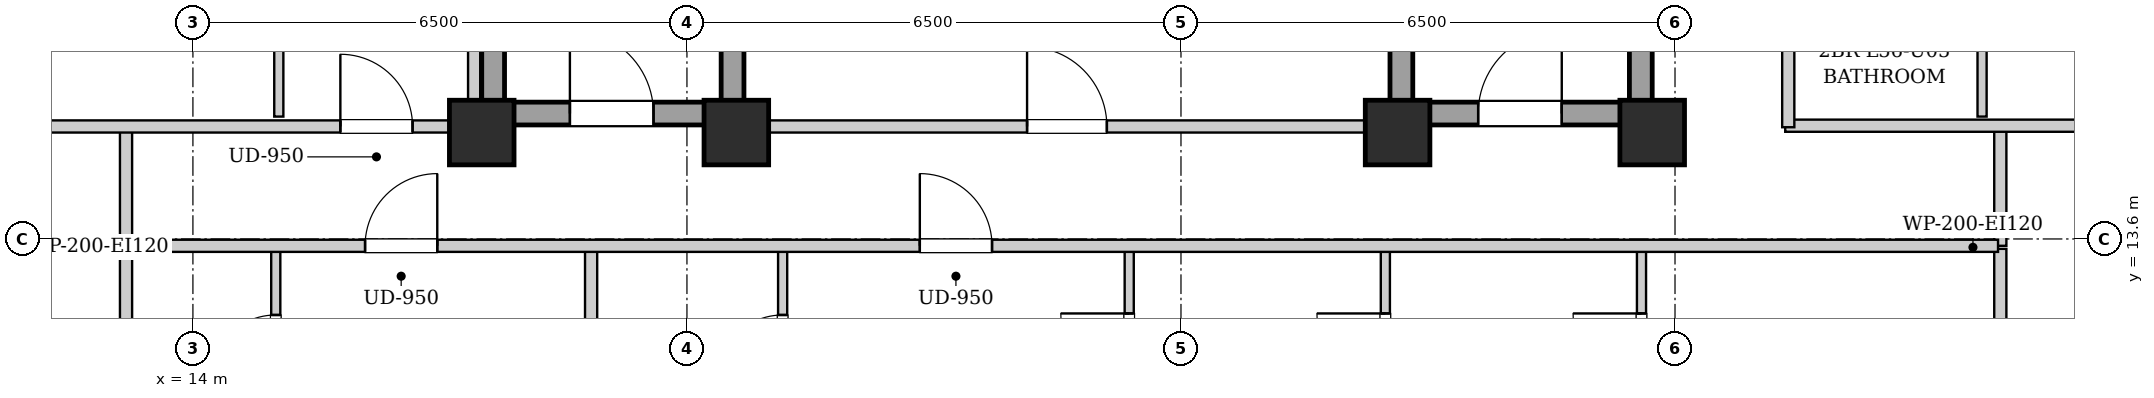
"""IFC4 building model, lengths in metres.
Left out: names, types, materials, properties, quantities, classifications, styles, units other than length and angle.
Written with IfcOpenShell. Run it as: python <this file> out.ifc"""

import sys

from ifc_helpers import new_model, si_unit, direction, frame, frame_2d, origin, origin_2d, place, context, subcontext, project, spatial, rectangle, extrude, element, fill, save


model = new_model("IFC4")
c1 = context("Model", 3, precision=1e-05, world=origin(), true_north=direction((0.0, 1.0)))
c2 = subcontext(c1, "Body", "Model", "MODEL_VIEW")
j1 = project(units=[si_unit("LENGTHUNIT", "METRE"), si_unit("PLANEANGLEUNIT", "RADIAN")], contexts=[c1])
p1 = place(None, origin())
s1 = spatial("IfcSite", under=j1, at=p1, CompositionType="ELEMENT")
p2 = place(p1, origin())
s2 = spatial("IfcBuilding", under=s1, at=p2, CompositionType="ELEMENT")
p3 = place(p2, frame((0.0, 0.0, 194.2)))
s3 = spatial("IfcBuildingStorey", under=s2, at=p3, CompositionType="ELEMENT", Elevation=194.2)
for number, where, z_axis, x_axis in (
    (1, (17.8, 15.0, 0.0), (0.0, 0.0, 1.0), (1.0, 0.0, 0.0)),
    (2, (21.15, 15.0, 0.0), (0.0, 0.0, 1.0), (1.0, 0.0, 0.0)),
    (3, (29.85, 15.0, 0.0), (0.0, 0.0, 1.0), (1.0, 0.0, 0.0)),
    (4, (33.2, 15.0, 0.0), (0.0, 0.0, 1.0), (1.0, 0.0, 0.0)),
):
    element("IfcColumn", number, at=place(p3, frame(where, z_axis=z_axis, x_axis=x_axis)), inside=s3, PredefinedType="COLUMN", context=c2, shape_type="SweptSolid", body=[
        extrude(rectangle(XDim=0.85, YDim=0.85, at=origin_2d()), origin(), (0.0, 0.0, 1.0), 3.3),
    ])
for number, where, z_axis, x_axis in (
    (5, (17.95, 15.1, 0.0), (0.0, 0.0, 1.0), (0.0, 1.0, 0.0)),
    (6, (21.1, 15.1, 0.0), (0.0, 0.0, 1.0), (0.0, 1.0, 0.0)),
):
    element("IfcWall", number, at=place(p3, frame(where, z_axis=z_axis, x_axis=x_axis)), inside=s3, PredefinedType="SHEAR", context=c2, shape_type="SweptSolid", body=[
        extrude(rectangle(XDim=9.0, YDim=0.3, at=frame_2d((4.5, 0.0))), origin(), (0.0, 0.0, 1.0), 3.04),
    ])
p4 = place(p3, frame((18.1, 15.25, 0.0), z_axis=(0.0, 0.0, 1.0), x_axis=(1.0, 0.0, 0.0)))
e7 = element("IfcWall", 7, at=p4, inside=s3, PredefinedType="SHEAR", context=c2, shape_type="SweptSolid", body=[
    extrude(rectangle(XDim=2.85, YDim=0.3, at=frame_2d((1.425, 0.0))), origin(), (0.0, 0.0, 1.0), 3.04),
])
p5 = place(p4, frame((0.86, 0.0, 0.0)))
e8 = element("IfcOpeningElement", 8, at=p5, cuts=e7, PredefinedType="OPENING", context=c2, shape_type="SweptSolid", body=[
    extrude(rectangle(XDim=1.1, YDim=2.05, at=frame_2d((0.55, 1.025))), frame((0.0, 0.16, 0.0), z_axis=(0.0, -1.0, 0.0), x_axis=(1.0, 0.0, 0.0)), (0.0, 0.0, 1.0), 0.32),
])
for number, where, z_axis, x_axis in (
    (9, (29.9, 15.1, 0.0), (0.0, 0.0, 1.0), (0.0, 1.0, 0.0)),
    (10, (33.05, 15.1, 0.0), (0.0, 0.0, 1.0), (0.0, 1.0, 0.0)),
):
    element("IfcWall", number, at=place(p3, frame(where, z_axis=z_axis, x_axis=x_axis)), inside=s3, PredefinedType="SHEAR", context=c2, shape_type="SweptSolid", body=[
        extrude(rectangle(XDim=9.0, YDim=0.3, at=frame_2d((4.5, 0.0))), origin(), (0.0, 0.0, 1.0), 3.04),
    ])
p6 = place(p3, frame((30.05, 15.25, 0.0), z_axis=(0.0, 0.0, 1.0), x_axis=(1.0, 0.0, 0.0)))
e11 = element("IfcWall", 11, at=p6, inside=s3, PredefinedType="SHEAR", context=c2, shape_type="SweptSolid", body=[
    extrude(rectangle(XDim=2.85, YDim=0.3, at=frame_2d((1.425, 0.0))), origin(), (0.0, 0.0, 1.0), 3.04),
])
p7 = place(p6, frame((0.86, 0.0, 0.0)))
e12 = element("IfcOpeningElement", 12, at=p7, cuts=e11, PredefinedType="OPENING", context=c2, shape_type="SweptSolid", body=[
    extrude(rectangle(XDim=1.1, YDim=2.05, at=frame_2d((0.55, 1.025))), frame((0.0, 0.16, 0.0), z_axis=(0.0, -1.0, 0.0), x_axis=(1.0, 0.0, 0.0)), (0.0, 0.0, 1.0), 0.32),
])
p8 = place(p3, frame((21.25, 15.08, 0.0), z_axis=(0.0, 0.0, 1.0), x_axis=(1.0, 0.0, 0.0)))
e13 = element("IfcWall", 13, at=p8, inside=s3, PredefinedType="PARTITIONING", context=c2, shape_type="SweptSolid", body=[
    extrude(rectangle(XDim=8.5, YDim=0.16, at=frame_2d((4.25, 0.0))), origin(), (0.0, 0.0, 1.0), 2.556),
])
p9 = place(p8, frame((3.725, 0.0, 0.0)))
e14 = element("IfcOpeningElement", 14, at=p9, cuts=e13, PredefinedType="OPENING", context=c2, shape_type="SweptSolid", body=[
    extrude(rectangle(XDim=1.05, YDim=2.05, at=frame_2d((0.525, 1.025))), frame((0.0, 0.09, 0.0), z_axis=(0.0, -1.0, 0.0), x_axis=(1.0, 0.0, 0.0)), (0.0, 0.0, 1.0), 0.18),
])
for number, where, z_axis, x_axis in (
    (15, (13.12, 13.51, 0.0), (0.0, 0.0, 1.0), (0.0, 1.0, 0.0)),
    (16, (37.78, 13.51, 0.0), (0.0, 0.0, 1.0), (0.0, 1.0, 0.0)),
):
    element("IfcWall", number, at=place(p3, frame(where, z_axis=z_axis, x_axis=x_axis)), inside=s3, PredefinedType="PARTITIONING", context=c2, shape_type="SweptSolid", body=[
        extrude(rectangle(XDim=1.58, YDim=0.16, at=frame_2d((0.79, 0.0))), origin(), (0.0, 0.0, 1.0), 3.04),
    ])
p10 = place(p3, frame((34.95, 15.09, 0.0), z_axis=(0.0, 0.0, 1.0), x_axis=(1.0, 0.0, 0.0)))
e17 = element("IfcWall", 17, at=p10, inside=s3, PredefinedType="PARTITIONING", context=c2, shape_type="SweptSolid", body=[
    extrude(rectangle(XDim=5.07, YDim=0.16, at=frame_2d((2.535, 0.0))), origin(), (0.0, 0.0, 1.0), 2.556),
])
p11 = place(p3, frame((13.12, 10.81, 0.0), z_axis=(0.0, 0.0, 1.0), x_axis=(0.0, 1.0, 0.0)))
e18 = element("IfcWall", 18, at=p11, inside=s3, PredefinedType="PARTITIONING", context=c2, shape_type="SweptSolid", body=[
    extrude(rectangle(XDim=2.66, YDim=0.16, at=frame_2d((1.33, 0.0))), origin(), (0.0, 0.0, 1.0), 3.04),
])
p12 = place(p3, frame((15.09, 10.87, 0.0), z_axis=(0.0, 0.0, 1.0), x_axis=(0.0, 1.0, 0.0)))
e19 = element("IfcWall", 19, at=p12, inside=s3, PredefinedType="PARTITIONING", context=c2, shape_type="SweptSolid", body=[
    extrude(rectangle(XDim=2.6, YDim=0.12, at=frame_2d((1.3, 0.0))), origin(), (0.0, 0.0, 1.0), 3.04),
])
p13 = place(p12, frame((0.87, 0.0, 0.0)))
e20 = element("IfcOpeningElement", 20, at=p13, cuts=e19, PredefinedType="OPENING", context=c2, shape_type="SweptSolid", body=[
    extrude(rectangle(XDim=0.86, YDim=2.05, at=frame_2d((0.43, 1.025))), frame((0.0, 0.07, 0.0), z_axis=(0.0, -1.0, 0.0), x_axis=(1.0, 0.0, 0.0)), (0.0, 0.0, 1.0), 0.14),
])
p14 = place(p3, frame((37.78, 10.81, 0.0), z_axis=(0.0, 0.0, 1.0), x_axis=(0.0, 1.0, 0.0)))
e21 = element("IfcWall", 21, at=p14, inside=s3, PredefinedType="PARTITIONING", context=c2, shape_type="SweptSolid", body=[
    extrude(rectangle(XDim=2.66, YDim=0.16, at=frame_2d((1.33, 0.0))), origin(), (0.0, 0.0, 1.0), 3.04),
])
p15 = place(p3, frame((19.239, 6.06, 0.0), z_axis=(0.0, 0.0, 1.0), x_axis=(0.0, 1.0, 0.0)))
e22 = element("IfcWall", 22, at=p15, inside=s3, PredefinedType="PARTITIONING", context=c2, shape_type="SweptSolid", body=[
    extrude(rectangle(XDim=7.41, YDim=0.16, at=frame_2d((3.705, 0.0))), origin(), (0.0, 0.0, 1.0), 3.04),
])
p16 = place(p3, frame((21.759, 10.87, 0.0), z_axis=(0.0, 0.0, 1.0), x_axis=(0.0, 1.0, 0.0)))
e23 = element("IfcWall", 23, at=p16, inside=s3, PredefinedType="PARTITIONING", context=c2, shape_type="SweptSolid", body=[
    extrude(rectangle(XDim=2.6, YDim=0.12, at=frame_2d((1.3, 0.0))), origin(), (0.0, 0.0, 1.0), 3.04),
])
p17 = place(p16, frame((0.87, 0.0, 0.0)))
e24 = element("IfcOpeningElement", 24, at=p17, cuts=e23, PredefinedType="OPENING", context=c2, shape_type="SweptSolid", body=[
    extrude(rectangle(XDim=0.86, YDim=2.05, at=frame_2d((0.43, 1.025))), frame((0.0, 0.07, 0.0), z_axis=(0.0, -1.0, 0.0), x_axis=(1.0, 0.0, 0.0)), (0.0, 0.0, 1.0), 0.14),
])
p18 = place(p3, frame((26.319, 10.87, 0.0), z_axis=(0.0, 0.0, 1.0), x_axis=(0.0, 1.0, 0.0)))
e25 = element("IfcWall", 25, at=p18, inside=s3, PredefinedType="PARTITIONING", context=c2, shape_type="SweptSolid", body=[
    extrude(rectangle(XDim=2.6, YDim=0.12, at=frame_2d((1.3, 0.0))), origin(), (0.0, 0.0, 1.0), 3.04),
])
p19 = place(p18, frame((0.85, 0.0, 0.0)))
e26 = element("IfcOpeningElement", 26, at=p19, cuts=e25, PredefinedType="OPENING", context=c2, shape_type="SweptSolid", body=[
    extrude(rectangle(XDim=0.9, YDim=2.05, at=frame_2d((0.45, 1.025))), frame((0.0, 0.07, 0.0), z_axis=(0.0, -1.0, 0.0), x_axis=(1.0, 0.0, 0.0)), (0.0, 0.0, 1.0), 0.14),
])
p20 = place(p3, frame((29.689, 10.87, 0.0), z_axis=(0.0, 0.0, 1.0), x_axis=(0.0, 1.0, 0.0)))
e27 = element("IfcWall", 27, at=p20, inside=s3, PredefinedType="PARTITIONING", context=c2, shape_type="SweptSolid", body=[
    extrude(rectangle(XDim=2.6, YDim=0.12, at=frame_2d((1.3, 0.0))), origin(), (0.0, 0.0, 1.0), 3.04),
])
p21 = place(p20, frame((0.85, 0.0, 0.0)))
e28 = element("IfcOpeningElement", 28, at=p21, cuts=e27, PredefinedType="OPENING", context=c2, shape_type="SweptSolid", body=[
    extrude(rectangle(XDim=0.9, YDim=2.05, at=frame_2d((0.45, 1.025))), frame((0.0, 0.07, 0.0), z_axis=(0.0, -1.0, 0.0), x_axis=(1.0, 0.0, 0.0)), (0.0, 0.0, 1.0), 0.14),
])
p22 = place(p3, frame((33.059, 10.87, 0.0), z_axis=(0.0, 0.0, 1.0), x_axis=(0.0, 1.0, 0.0)))
e29 = element("IfcWall", 29, at=p22, inside=s3, PredefinedType="PARTITIONING", context=c2, shape_type="SweptSolid", body=[
    extrude(rectangle(XDim=2.6, YDim=0.12, at=frame_2d((1.3, 0.0))), origin(), (0.0, 0.0, 1.0), 3.04),
])
p23 = place(p22, frame((0.85, 0.0, 0.0)))
e30 = element("IfcOpeningElement", 30, at=p23, cuts=e29, PredefinedType="OPENING", context=c2, shape_type="SweptSolid", body=[
    extrude(rectangle(XDim=0.9, YDim=2.05, at=frame_2d((0.45, 1.025))), frame((0.0, 0.07, 0.0), z_axis=(0.0, -1.0, 0.0), x_axis=(1.0, 0.0, 0.0)), (0.0, 0.0, 1.0), 0.14),
])
p24 = place(p3, frame((10.88, 15.08, 0.0), z_axis=(0.0, 0.0, 1.0), x_axis=(1.0, 0.0, 0.0)))
e31 = element("IfcWall", 31, at=p24, inside=s3, PredefinedType="PARTITIONING", context=c2, shape_type="SweptSolid", body=[
    extrude(rectangle(XDim=6.88, YDim=0.16, at=frame_2d((3.44, 0.0))), origin(), (0.0, 0.0, 1.0), 2.556),
])
p25 = place(p24, frame((5.06, 0.0, 0.0)))
e32 = element("IfcOpeningElement", 32, at=p25, cuts=e31, PredefinedType="OPENING", context=c2, shape_type="SweptSolid", body=[
    extrude(rectangle(XDim=0.95, YDim=2.1, at=frame_2d((0.475, 1.05))), frame((0.0, 0.09, 0.0), z_axis=(0.0, -1.0, 0.0), x_axis=(1.0, 0.0, 0.0)), (0.0, 0.0, 1.0), 0.18),
])
p26 = place(p3, frame((15.13, 15.21, 0.0), z_axis=(0.0, 0.0, 1.0), x_axis=(0.0, 1.0, 0.0)))
e33 = element("IfcWall", 33, at=p26, inside=s3, PredefinedType="PARTITIONING", context=c2, shape_type="SweptSolid", body=[
    extrude(rectangle(XDim=4.308, YDim=0.12, at=frame_2d((2.154, 0.0))), origin(), (0.0, 0.0, 1.0), 3.04),
])
p27 = place(p26, frame((1.704, 0.0, 0.0)))
e34 = element("IfcOpeningElement", 34, at=p27, cuts=e33, PredefinedType="OPENING", context=c2, shape_type="SweptSolid", body=[
    extrude(rectangle(XDim=0.9, YDim=2.05, at=frame_2d((0.45, 1.025))), frame((0.0, 0.07, 0.0), z_axis=(0.0, -1.0, 0.0), x_axis=(1.0, 0.0, 0.0)), (0.0, 0.0, 1.0), 0.14),
])
p28 = place(p3, frame((37.54, 15.21, 0.0), z_axis=(0.0, 0.0, 1.0), x_axis=(0.0, 1.0, 0.0)))
e35 = element("IfcWall", 35, at=p28, inside=s3, PredefinedType="PARTITIONING", context=c2, shape_type="SweptSolid", body=[
    extrude(rectangle(XDim=2.3, YDim=0.12, at=frame_2d((1.15, 0.0))), origin(), (0.0, 0.0, 1.0), 3.04),
])
p29 = place(p3, frame((13.15, 13.51, 0.0), z_axis=(0.0, 0.0, 1.0), x_axis=(1.0, 0.0, 0.0)))
e36 = element("IfcWall", 36, at=p29, inside=s3, PredefinedType="PARTITIONING", context=c2, shape_type="SweptSolid", body=[
    extrude(rectangle(XDim=24.6, YDim=0.16, at=frame_2d((12.3, 0.0))), origin(), (0.0, 0.0, 1.0), 3.04),
])
p30 = place(p29, frame((3.115, 0.0, 0.0)))
e37 = element("IfcOpeningElement", 37, at=p30, cuts=e36, PredefinedType="OPENING", context=c2, shape_type="SweptSolid", body=[
    extrude(rectangle(XDim=0.95, YDim=2.1, at=frame_2d((0.475, 1.05))), frame((0.0, 0.09, 0.0), z_axis=(0.0, -1.0, 0.0), x_axis=(1.0, 0.0, 0.0)), (0.0, 0.0, 1.0), 0.18),
])
p31 = place(p29, frame((10.414, 0.0, 0.0)))
e38 = element("IfcOpeningElement", 38, at=p31, cuts=e36, PredefinedType="OPENING", context=c2, shape_type="SweptSolid", body=[
    extrude(rectangle(XDim=0.95, YDim=2.1, at=frame_2d((0.475, 1.05))), frame((0.0, 0.09, 0.0), z_axis=(0.0, -1.0, 0.0), x_axis=(1.0, 0.0, 0.0)), (0.0, 0.0, 1.0), 0.18),
])
p32 = place(p3, frame((17.7, 15.02, 0.0), z_axis=(0.0, 0.0, 1.0), x_axis=(0.0, 1.0, 0.0)))
e39 = element("IfcWall", 39, at=p32, inside=s3, PredefinedType="PARTITIONING", context=c2, shape_type="SweptSolid", body=[
    extrude(rectangle(XDim=13.98, YDim=0.16, at=frame_2d((6.99, 0.0))), origin(), (0.0, 0.0, 1.0), 3.04),
])
p33 = place(p3, frame((34.99, 15.07, 0.0), z_axis=(0.0, 0.0, 1.0), x_axis=(0.0, 1.0, 0.0)))
e40 = element("IfcWall", 40, at=p33, inside=s3, PredefinedType="PARTITIONING", context=c2, shape_type="SweptSolid", body=[
    extrude(rectangle(XDim=13.93, YDim=0.16, at=frame_2d((6.965, 0.0))), origin(), (0.0, 0.0, 1.0), 3.04),
])
p34 = place(p33, frame((4.385, 0.0, 0.0)))
e41 = element("IfcOpeningElement", 41, at=p34, cuts=e40, PredefinedType="OPENING", context=c2, shape_type="SweptSolid", body=[
    extrude(rectangle(XDim=0.95, YDim=2.1, at=frame_2d((0.475, 1.05))), frame((0.0, 0.09, 0.0), z_axis=(0.0, -1.0, 0.0), x_axis=(1.0, 0.0, 0.0)), (0.0, 0.0, 1.0), 0.18),
])
p35 = place(p5, origin())
e42 = element("IfcDoor", 42, at=p35, inside=s3, OperationType="SINGLE_SWING_LEFT", PredefinedType="DOOR", context=c2, shape_type="SweptSolid", body=[
    extrude(rectangle(XDim=1.1, YDim=2.05, at=frame_2d((0.55, 1.025))), frame((0.0, 0.025, 0.0), z_axis=(0.0, -1.0, 0.0), x_axis=(1.0, 0.0, 0.0)), (0.0, 0.0, 1.0), 0.05),
])
fill(e8, e42)
p36 = place(p7, origin())
e43 = element("IfcDoor", 43, at=p36, inside=s3, OperationType="SINGLE_SWING_RIGHT", PredefinedType="DOOR", context=c2, shape_type="SweptSolid", body=[
    extrude(rectangle(XDim=1.1, YDim=2.05, at=frame_2d((0.55, 1.025))), frame((0.0, 0.025, 0.0), z_axis=(0.0, -1.0, 0.0), x_axis=(1.0, 0.0, 0.0)), (0.0, 0.0, 1.0), 0.05),
])
fill(e12, e43)
p37 = place(p9, origin())
e44 = element("IfcDoor", 44, at=p37, inside=s3, OperationType="SINGLE_SWING_LEFT", PredefinedType="DOOR", context=c2, shape_type="SweptSolid", body=[
    extrude(rectangle(XDim=1.05, YDim=2.05, at=frame_2d((0.525, 1.025))), frame((0.0, 0.025, 0.0), z_axis=(0.0, -1.0, 0.0), x_axis=(1.0, 0.0, 0.0)), (0.0, 0.0, 1.0), 0.05),
])
fill(e14, e44)
p38 = place(p13, origin())
e45 = element("IfcDoor", 45, at=p38, inside=s3, OperationType="SINGLE_SWING_LEFT", PredefinedType="DOOR", context=c2, shape_type="SweptSolid", body=[
    extrude(rectangle(XDim=0.86, YDim=2.05, at=frame_2d((0.43, 1.025))), frame((0.0, 0.025, 0.0), z_axis=(0.0, -1.0, 0.0), x_axis=(1.0, 0.0, 0.0)), (0.0, 0.0, 1.0), 0.05),
])
fill(e20, e45)
p39 = place(p17, origin())
e46 = element("IfcDoor", 46, at=p39, inside=s3, OperationType="SINGLE_SWING_LEFT", PredefinedType="DOOR", context=c2, shape_type="SweptSolid", body=[
    extrude(rectangle(XDim=0.86, YDim=2.05, at=frame_2d((0.43, 1.025))), frame((0.0, 0.025, 0.0), z_axis=(0.0, -1.0, 0.0), x_axis=(1.0, 0.0, 0.0)), (0.0, 0.0, 1.0), 0.05),
])
fill(e24, e46)
p40 = place(p19, origin())
e47 = element("IfcDoor", 47, at=p40, inside=s3, OperationType="SINGLE_SWING_RIGHT", PredefinedType="DOOR", context=c2, shape_type="SweptSolid", body=[
    extrude(rectangle(XDim=0.9, YDim=2.05, at=frame_2d((0.45, 1.025))), frame((0.0, 0.025, 0.0), z_axis=(0.0, -1.0, 0.0), x_axis=(1.0, 0.0, 0.0)), (0.0, 0.0, 1.0), 0.05),
])
fill(e26, e47)
p41 = place(p21, origin())
e48 = element("IfcDoor", 48, at=p41, inside=s3, OperationType="SINGLE_SWING_RIGHT", PredefinedType="DOOR", context=c2, shape_type="SweptSolid", body=[
    extrude(rectangle(XDim=0.9, YDim=2.05, at=frame_2d((0.45, 1.025))), frame((0.0, 0.025, 0.0), z_axis=(0.0, -1.0, 0.0), x_axis=(1.0, 0.0, 0.0)), (0.0, 0.0, 1.0), 0.05),
])
fill(e28, e48)
p42 = place(p23, origin())
e49 = element("IfcDoor", 49, at=p42, inside=s3, OperationType="SINGLE_SWING_RIGHT", PredefinedType="DOOR", context=c2, shape_type="SweptSolid", body=[
    extrude(rectangle(XDim=0.9, YDim=2.05, at=frame_2d((0.45, 1.025))), frame((0.0, 0.025, 0.0), z_axis=(0.0, -1.0, 0.0), x_axis=(1.0, 0.0, 0.0)), (0.0, 0.0, 1.0), 0.05),
])
fill(e30, e49)
p43 = place(p25, origin())
e50 = element("IfcDoor", 50, at=p43, inside=s3, OperationType="SINGLE_SWING_LEFT", PredefinedType="DOOR", context=c2, shape_type="SweptSolid", body=[
    extrude(rectangle(XDim=0.95, YDim=2.1, at=frame_2d((0.475, 1.05))), frame((0.0, 0.025, 0.0), z_axis=(0.0, -1.0, 0.0), x_axis=(1.0, 0.0, 0.0)), (0.0, 0.0, 1.0), 0.05),
])
fill(e32, e50)
p44 = place(p30, origin())
e51 = element("IfcDoor", 51, at=p44, inside=s3, OperationType="SINGLE_SWING_RIGHT", PredefinedType="DOOR", context=c2, shape_type="SweptSolid", body=[
    extrude(rectangle(XDim=0.95, YDim=2.1, at=frame_2d((0.475, 1.05))), frame((0.0, 0.025, 0.0), z_axis=(0.0, -1.0, 0.0), x_axis=(1.0, 0.0, 0.0)), (0.0, 0.0, 1.0), 0.05),
])
fill(e37, e51)
p45 = place(p31, origin())
e52 = element("IfcDoor", 52, at=p45, inside=s3, OperationType="SINGLE_SWING_LEFT", PredefinedType="DOOR", context=c2, shape_type="SweptSolid", body=[
    extrude(rectangle(XDim=0.95, YDim=2.1, at=frame_2d((0.475, 1.05))), frame((0.0, 0.025, 0.0), z_axis=(0.0, -1.0, 0.0), x_axis=(1.0, 0.0, 0.0)), (0.0, 0.0, 1.0), 0.05),
])
fill(e38, e52)
save(model, sys.argv[1])
